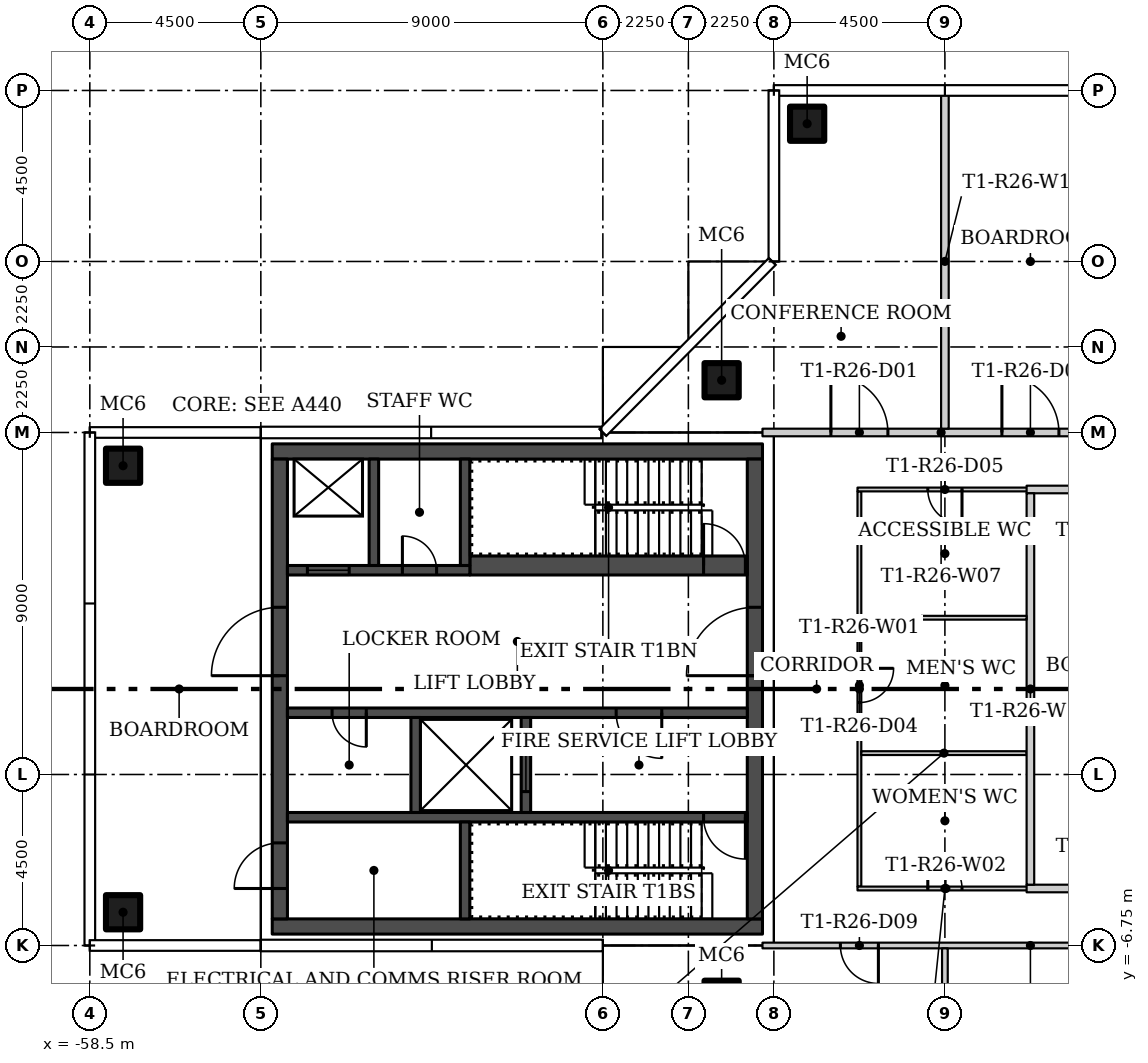
"""IFC4 building model, lengths in metres.
Left out: names, types, materials, properties, quantities, classifications, styles, units other than length and angle.
Written with IfcOpenShell. Run it as: python <this file> out.ifc"""

import sys

from ifc_helpers import new_model, si_unit, direction, frame, frame_2d, origin, origin_2d, place, context, subcontext, project, spatial, rectangle, hollow_rectangle, extrude, element, fill, save


model = new_model("IFC4")
c1 = context("Model", 3, precision=1e-05, world=origin(), true_north=direction((0.0, 1.0)))
c2 = subcontext(c1, "Body", "Model", "MODEL_VIEW")
j1 = project(units=[si_unit("LENGTHUNIT", "METRE"), si_unit("PLANEANGLEUNIT", "RADIAN")], contexts=[c1])
p1 = place(None, origin())
s1 = spatial("IfcSite", under=j1, at=p1, CompositionType="ELEMENT")
p2 = place(p1, origin())
s2 = spatial("IfcBuilding", under=s1, at=p2, CompositionType="ELEMENT")
p3 = place(p2, frame((0.0, 0.0, 242.1)))
s3 = spatial("IfcBuildingStorey", under=s2, at=p3, CompositionType="ELEMENT", Elevation=242.1)
for number, where in (
    (1, (-41.875, 8.125, 0.0)),
    (2, (-41.875, -8.125, 0.0)),
    (3, (-57.625, -5.875, 0.0)),
    (4, (-57.625, 5.875, 0.0)),
    (5, (-39.625, 14.875, 0.0)),
):
    element("IfcColumn", number, at=place(p3, frame(where)), inside=s3, PredefinedType="COLUMN", context=c2, shape_type="SweptSolid", body=[
        extrude(hollow_rectangle(XDim=0.9, YDim=0.9, WallThickness=0.036, at=origin_2d()), origin(), (0.0, 0.0, 1.0), 3.55),
    ])
p4 = place(p3, frame((-38.25, 5.2, 0.0), z_axis=(0.0, 0.0, 1.0), x_axis=(0.0, -1.0, 0.0)))
e6 = element("IfcWall", 6, at=p4, inside=s3, PredefinedType="PARTITIONING", context=c2, shape_type="SweptSolid", body=[
    extrude(rectangle(XDim=10.4, YDim=0.1, at=frame_2d((5.2, 0.0))), origin(), (0.0, 0.0, 1.0), 3.55),
])
p5 = place(p4, frame((4.656, 0.0, 0.0)))
e7 = element("IfcOpeningElement", 7, at=p5, cuts=e6, PredefinedType="OPENING", context=c2, shape_type="SweptSolid", body=[
    extrude(rectangle(XDim=0.9, YDim=2.1, at=frame_2d((0.45, 1.05))), frame((0.0, 0.06, 0.0), z_axis=(0.0, -1.0, 0.0), x_axis=(1.0, 0.0, 0.0)), (0.0, 0.0, 1.0), 0.12),
])
p6 = place(p3, frame((-38.3, -5.25, 0.0)))
e8 = element("IfcWall", 8, at=p6, inside=s3, PredefinedType="PARTITIONING", context=c2, shape_type="SweptSolid", body=[
    extrude(rectangle(XDim=4.65, YDim=0.1, at=frame_2d((2.325, 0.0))), origin(), (0.0, 0.0, 1.0), 3.55),
])
p7 = place(p6, frame((1.85, 0.0, 0.0)))
e9 = element("IfcOpeningElement", 9, at=p7, cuts=e8, PredefinedType="OPENING", context=c2, shape_type="SweptSolid", body=[
    extrude(rectangle(XDim=0.9, YDim=2.1, at=frame_2d((0.45, 1.05))), frame((0.0, 0.06, 0.0), z_axis=(0.0, -1.0, 0.0), x_axis=(1.0, 0.0, 0.0)), (0.0, 0.0, 1.0), 0.12),
])
p8 = place(p3, frame((-33.65, 5.25, 0.0), z_axis=(0.0, 0.0, 1.0), x_axis=(-1.0, 0.0, 0.0)))
e10 = element("IfcWall", 10, at=p8, inside=s3, PredefinedType="PARTITIONING", context=c2, shape_type="SweptSolid", body=[
    extrude(rectangle(XDim=4.65, YDim=0.1, at=frame_2d((2.325, 0.0))), origin(), (0.0, 0.0, 1.0), 3.55),
])
p9 = place(p8, frame((1.9, 0.0, 0.0)))
e11 = element("IfcOpeningElement", 11, at=p9, cuts=e10, PredefinedType="OPENING", context=c2, shape_type="SweptSolid", body=[
    extrude(rectangle(XDim=0.9, YDim=2.1, at=frame_2d((0.45, 1.05))), frame((0.0, 0.06, 0.0), z_axis=(0.0, -1.0, 0.0), x_axis=(1.0, 0.0, 0.0)), (0.0, 0.0, 1.0), 0.12),
])
p10 = place(p3, frame((-33.85, -5.25, 0.0)))
e12 = element("IfcWall", 12, at=p10, inside=s3, PredefinedType="PARTITIONING", context=c2, shape_type="SweptSolid", body=[
    extrude(rectangle(XDim=4.7, YDim=0.2, at=frame_2d((2.35, 0.0))), origin(), (0.0, 0.0, 1.0), 3.55),
])
p11 = place(p3, frame((-29.15, 5.25, 0.0), z_axis=(0.0, 0.0, 1.0), x_axis=(-1.0, 0.0, 0.0)))
e13 = element("IfcWall", 13, at=p11, inside=s3, PredefinedType="PARTITIONING", context=c2, shape_type="SweptSolid", body=[
    extrude(rectangle(XDim=4.7, YDim=0.2, at=frame_2d((2.35, 0.0))), origin(), (0.0, 0.0, 1.0), 3.55),
])
p12 = place(p3, frame((-40.8, 6.75, 0.0)))
e14 = element("IfcWall", 14, at=p12, inside=s3, PredefinedType="PARTITIONING", context=c2, shape_type="SweptSolid", body=[
    extrude(rectangle(XDim=9.4, YDim=0.2, at=frame_2d((4.7, 0.0))), origin(), (0.0, 0.0, 1.0), 3.55),
])
p13 = place(p12, frame((1.8, 0.0, 0.0)))
e15 = element("IfcOpeningElement", 15, at=p13, cuts=e14, PredefinedType="OPENING", context=c2, shape_type="SweptSolid", body=[
    extrude(rectangle(XDim=1.5, YDim=2.4, at=frame_2d((0.75, 1.2))), frame((0.0, 0.11, 0.0), z_axis=(0.0, -1.0, 0.0), x_axis=(1.0, 0.0, 0.0)), (0.0, 0.0, 1.0), 0.22),
])
p14 = place(p12, frame((6.3, 0.0, 0.0)))
e16 = element("IfcOpeningElement", 16, at=p14, cuts=e14, PredefinedType="OPENING", context=c2, shape_type="SweptSolid", body=[
    extrude(rectangle(XDim=1.5, YDim=2.4, at=frame_2d((0.75, 1.2))), frame((0.0, 0.11, 0.0), z_axis=(0.0, -1.0, 0.0), x_axis=(1.0, 0.0, 0.0)), (0.0, 0.0, 1.0), 0.22),
])
p15 = place(p3, frame((-26.7, -6.75, 0.0), z_axis=(0.0, 0.0, 1.0), x_axis=(-1.0, 0.0, 0.0)))
e17 = element("IfcWall", 17, at=p15, inside=s3, PredefinedType="PARTITIONING", context=c2, shape_type="SweptSolid", body=[
    extrude(rectangle(XDim=14.1, YDim=0.15, at=frame_2d((7.05, 0.0))), origin(), (0.0, 0.0, 1.0), 3.55),
])
p16 = place(p15, frame((4.05, 0.0, 0.0)))
e18 = element("IfcOpeningElement", 18, at=p16, cuts=e17, PredefinedType="OPENING", context=c2, shape_type="SweptSolid", body=[
    extrude(rectangle(XDim=1.5, YDim=2.1, at=frame_2d((0.75, 1.05))), frame((0.0, 0.085, 0.0), z_axis=(0.0, -1.0, 0.0), x_axis=(1.0, 0.0, 0.0)), (0.0, 0.0, 1.0), 0.17),
])
p17 = place(p15, frame((11.05, 0.0, 0.0)))
e19 = element("IfcOpeningElement", 19, at=p17, cuts=e17, PredefinedType="OPENING", context=c2, shape_type="SweptSolid", body=[
    extrude(rectangle(XDim=1.0, YDim=2.4, at=frame_2d((0.5, 1.2))), frame((0.0, 0.085, 0.0), z_axis=(0.0, -1.0, 0.0), x_axis=(1.0, 0.0, 0.0)), (0.0, 0.0, 1.0), 0.17),
])
p18 = place(p3, frame((-33.85, -1.688, 0.0), z_axis=(0.0, 0.0, 1.0), x_axis=(-1.0, 0.0, 0.0)))
e20 = element("IfcWall", 20, at=p18, inside=s3, PredefinedType="PARTITIONING", context=c2, shape_type="SweptSolid", body=[
    extrude(rectangle(XDim=4.35, YDim=0.1, at=frame_2d((2.175, 0.0))), origin(), (0.0, 0.0, 1.0), 3.55),
])
p19 = place(p3, frame((-33.75, -5.15, 0.0), z_axis=(0.0, 0.0, 1.0), x_axis=(0.0, 1.0, 0.0)))
e21 = element("IfcWall", 21, at=p19, inside=s3, PredefinedType="PARTITIONING", context=c2, shape_type="SweptSolid", body=[
    extrude(rectangle(XDim=10.3, YDim=0.2, at=frame_2d((5.15, 0.0))), origin(), (0.0, 0.0, 1.0), 3.55),
])
p20 = place(p3, frame((-33.85, 1.875, 0.0), z_axis=(0.0, 0.0, 1.0), x_axis=(-1.0, 0.0, 0.0)))
e22 = element("IfcWall", 22, at=p20, inside=s3, PredefinedType="PARTITIONING", context=c2, shape_type="SweptSolid", body=[
    extrude(rectangle(XDim=4.35, YDim=0.1, at=frame_2d((2.175, 0.0))), origin(), (0.0, 0.0, 1.0), 3.55),
])
p21 = place(p3, frame((-36.0, 6.85, 0.0), z_axis=(0.0, 0.0, 1.0), x_axis=(0.0, 1.0, 0.0)))
e23 = element("IfcWall", 23, at=p21, inside=s3, PredefinedType="PARTITIONING", context=c2, shape_type="SweptSolid", body=[
    extrude(rectangle(XDim=8.805, YDim=0.2, at=frame_2d((4.402, 0.0))), origin(), (0.0, 0.0, 1.0), 3.55),
])
p22 = place(p3, frame((-36.0, -20.155, 0.0), z_axis=(0.0, 0.0, 1.0), x_axis=(0.0, 1.0, 0.0)))
e24 = element("IfcWall", 24, at=p22, inside=s3, PredefinedType="PARTITIONING", context=c2, shape_type="SweptSolid", body=[
    extrude(rectangle(XDim=13.33, YDim=0.15, at=frame_2d((6.665, 0.0))), origin(), (0.0, 0.0, 1.0), 3.55),
])
for number, where, z_axis, x_axis in (
    (25, (-40.8, -6.25, 0.0), (0.0, 0.0, 1.0), (-1.0, 0.0, 0.0)),
    (26, (-40.8, 6.25, 0.0), (0.0, 0.0, 1.0), (-1.0, 0.0, 0.0)),
):
    element("IfcWall", number, at=place(p3, frame(where, z_axis=z_axis, x_axis=x_axis)), inside=s3, PredefinedType="SHEAR", context=c2, shape_type="SweptSolid", body=[
        extrude(rectangle(XDim=12.9, YDim=0.4, at=frame_2d((6.45, 0.0))), origin(), (0.0, 0.0, 1.0), 3.55),
    ])
p23 = place(p3, frame((-41.0, -6.05, 0.0), z_axis=(0.0, 0.0, 1.0), x_axis=(0.0, 1.0, 0.0)))
e27 = element("IfcWall", 27, at=p23, inside=s3, PredefinedType="SHEAR", context=c2, shape_type="SweptSolid", body=[
    extrude(rectangle(XDim=12.1, YDim=0.4, at=frame_2d((6.05, 0.0))), origin(), (0.0, 0.0, 1.0), 3.55),
])
p24 = place(p23, frame((6.4, 0.0, 0.0)))
e28 = element("IfcOpeningElement", 28, at=p24, cuts=e27, PredefinedType="OPENING", context=c2, shape_type="SweptSolid", body=[
    extrude(rectangle(XDim=1.8, YDim=2.4, at=frame_2d((0.9, 1.2))), frame((0.0, 0.21, 0.0), z_axis=(0.0, -1.0, 0.0), x_axis=(1.0, 0.0, 0.0)), (0.0, 0.0, 1.0), 0.42),
])
p25 = place(p3, frame((-53.5, -6.05, 0.0), z_axis=(0.0, 0.0, 1.0), x_axis=(0.0, 1.0, 0.0)))
e29 = element("IfcWall", 29, at=p25, inside=s3, PredefinedType="SHEAR", context=c2, shape_type="SweptSolid", body=[
    extrude(rectangle(XDim=12.1, YDim=0.4, at=frame_2d((6.05, 0.0))), origin(), (0.0, 0.0, 1.0), 3.55),
])
p26 = place(p25, frame((0.8, 0.0, 0.0)))
e30 = element("IfcOpeningElement", 30, at=p26, cuts=e29, PredefinedType="OPENING", context=c2, shape_type="SweptSolid", body=[
    extrude(rectangle(XDim=1.2, YDim=2.1, at=frame_2d((0.6, 1.05))), frame((0.0, 0.21, 0.0), z_axis=(0.0, -1.0, 0.0), x_axis=(1.0, 0.0, 0.0)), (0.0, 0.0, 1.0), 0.42),
])
p27 = place(p25, frame((6.4, 0.0, 0.0)))
e31 = element("IfcOpeningElement", 31, at=p27, cuts=e29, PredefinedType="OPENING", context=c2, shape_type="SweptSolid", body=[
    extrude(rectangle(XDim=1.8, YDim=2.4, at=frame_2d((0.9, 1.2))), frame((0.0, 0.21, 0.0), z_axis=(0.0, -1.0, 0.0), x_axis=(1.0, 0.0, 0.0)), (0.0, 0.0, 1.0), 0.42),
])
p28 = place(p3, frame((-41.2, -3.375, 0.0), z_axis=(0.0, 0.0, 1.0), x_axis=(-1.0, 0.0, 0.0)))
e32 = element("IfcWall", 32, at=p28, inside=s3, PredefinedType="SHEAR", context=c2, shape_type="SweptSolid", body=[
    extrude(rectangle(XDim=12.1, YDim=0.25, at=frame_2d((6.05, 0.0))), origin(), (0.0, 0.0, 1.0), 3.55),
])
p29 = place(p28, frame((0.05, 0.0, 0.0)))
e33 = element("IfcOpeningElement", 33, at=p29, cuts=e32, PredefinedType="OPENING", context=c2, shape_type="SweptSolid", body=[
    extrude(rectangle(XDim=1.1, YDim=2.1, at=frame_2d((0.55, 1.05))), frame((0.0, 0.135, 0.0), z_axis=(0.0, -1.0, 0.0), x_axis=(1.0, 0.0, 0.0)), (0.0, 0.0, 1.0), 0.27),
])
p30 = place(p3, frame((-48.625, -6.05, 0.0), z_axis=(0.0, 0.0, 1.0), x_axis=(0.0, 1.0, 0.0)))
e34 = element("IfcWall", 34, at=p30, inside=s3, PredefinedType="SHEAR", context=c2, shape_type="SweptSolid", body=[
    extrude(rectangle(XDim=2.55, YDim=0.25, at=frame_2d((1.275, 0.0))), origin(), (0.0, 0.0, 1.0), 3.55),
])
p31 = place(p3, frame((-41.2, -0.625, 0.0), z_axis=(0.0, 0.0, 1.0), x_axis=(-1.0, 0.0, 0.0)))
e35 = element("IfcWall", 35, at=p31, inside=s3, PredefinedType="SHEAR", context=c2, shape_type="SweptSolid", body=[
    extrude(rectangle(XDim=12.1, YDim=0.25, at=frame_2d((6.05, 0.0))), origin(), (0.0, 0.0, 1.0), 3.55),
])
p32 = place(p31, frame((2.25, 0.0, 0.0)))
e36 = element("IfcOpeningElement", 36, at=p32, cuts=e35, PredefinedType="OPENING", context=c2, shape_type="SweptSolid", body=[
    extrude(rectangle(XDim=1.2, YDim=2.1, at=frame_2d((0.6, 1.05))), frame((0.0, 0.135, 0.0), z_axis=(0.0, -1.0, 0.0), x_axis=(1.0, 0.0, 0.0)), (0.0, 0.0, 1.0), 0.27),
])
p33 = place(p31, frame((10.025, 0.0, 0.0)))
e37 = element("IfcOpeningElement", 37, at=p33, cuts=e35, PredefinedType="OPENING", context=c2, shape_type="SweptSolid", body=[
    extrude(rectangle(XDim=0.9, YDim=2.1, at=frame_2d((0.45, 1.05))), frame((0.0, 0.135, 0.0), z_axis=(0.0, -1.0, 0.0), x_axis=(1.0, 0.0, 0.0)), (0.0, 0.0, 1.0), 0.27),
])
p34 = place(p3, frame((-47.025, -3.25, 0.0), z_axis=(0.0, 0.0, 1.0), x_axis=(0.0, 1.0, 0.0)))
e38 = element("IfcWall", 38, at=p34, inside=s3, PredefinedType="SHEAR", context=c2, shape_type="SweptSolid", body=[
    extrude(rectangle(XDim=2.5, YDim=0.25, at=frame_2d((1.25, 0.0))), origin(), (0.0, 0.0, 1.0), 3.55),
])
p35 = place(p34, frame((0.55, 0.0, 0.0)))
e39 = element("IfcOpeningElement", 39, at=p35, cuts=e38, PredefinedType="OPENING", context=c2, shape_type="SweptSolid", body=[
    extrude(rectangle(XDim=1.4, YDim=2.4, at=frame_2d((0.7, 1.2))), frame((0.0, 0.135, 0.0), z_axis=(0.0, -1.0, 0.0), x_axis=(1.0, 0.0, 0.0)), (0.0, 0.0, 1.0), 0.27),
])
p36 = place(p3, frame((-49.925, -3.25, 0.0), z_axis=(0.0, 0.0, 1.0), x_axis=(0.0, 1.0, 0.0)))
e40 = element("IfcWall", 40, at=p36, inside=s3, PredefinedType="SHEAR", context=c2, shape_type="SweptSolid", body=[
    extrude(rectangle(XDim=2.5, YDim=0.25, at=frame_2d((1.25, 0.0))), origin(), (0.0, 0.0, 1.0), 3.55),
])
p37 = place(p3, frame((-48.5, 3.25, 0.0)))
e41 = element("IfcWall", 41, at=p37, inside=s3, PredefinedType="SHEAR", context=c2, shape_type="SweptSolid", body=[
    extrude(rectangle(XDim=7.3, YDim=0.5, at=frame_2d((3.65, 0.0))), origin(), (0.0, 0.0, 1.0), 3.55),
])
p38 = place(p37, frame((6.15, 0.0, 0.0)))
e42 = element("IfcOpeningElement", 42, at=p38, cuts=e41, PredefinedType="OPENING", context=c2, shape_type="SweptSolid", body=[
    extrude(rectangle(XDim=1.1, YDim=2.1, at=frame_2d((0.55, 1.05))), frame((0.0, 0.26, 0.0), z_axis=(0.0, -1.0, 0.0), x_axis=(1.0, 0.0, 0.0)), (0.0, 0.0, 1.0), 0.52),
])
p39 = place(p3, frame((-53.3, 3.125, 0.0)))
e43 = element("IfcWall", 43, at=p39, inside=s3, PredefinedType="SHEAR", context=c2, shape_type="SweptSolid", body=[
    extrude(rectangle(XDim=4.8, YDim=0.25, at=frame_2d((2.4, 0.0))), origin(), (0.0, 0.0, 1.0), 3.55),
])
p40 = place(p39, frame((0.525, 0.0, 0.0)))
e44 = element("IfcOpeningElement", 44, at=p40, cuts=e43, PredefinedType="OPENING", context=c2, shape_type="SweptSolid", body=[
    extrude(rectangle(XDim=1.1, YDim=2.1, at=frame_2d((0.55, 1.05))), frame((0.0, 0.135, 0.0), z_axis=(0.0, -1.0, 0.0), x_axis=(1.0, 0.0, 0.0)), (0.0, 0.0, 1.0), 0.27),
])
p41 = place(p39, frame((3.025, 0.0, 0.0)))
e45 = element("IfcOpeningElement", 45, at=p41, cuts=e43, PredefinedType="OPENING", context=c2, shape_type="SweptSolid", body=[
    extrude(rectangle(XDim=0.9, YDim=2.1, at=frame_2d((0.45, 1.05))), frame((0.0, 0.135, 0.0), z_axis=(0.0, -1.0, 0.0), x_axis=(1.0, 0.0, 0.0)), (0.0, 0.0, 1.0), 0.27),
])
for number, where, z_axis, x_axis in (
    (46, (-48.625, 3.25, 0.0), (0.0, 0.0, 1.0), (0.0, 1.0, 0.0)),
    (47, (-51.025, 3.25, 0.0), (0.0, 0.0, 1.0), (0.0, 1.0, 0.0)),
):
    element("IfcWall", number, at=place(p3, frame(where, z_axis=z_axis, x_axis=x_axis)), inside=s3, PredefinedType="SHEAR", context=c2, shape_type="SweptSolid", body=[
        extrude(rectangle(XDim=2.8, YDim=0.25, at=frame_2d((1.4, 0.0))), origin(), (0.0, 0.0, 1.0), 3.55),
    ])
p42 = place(p13, origin())
e48 = element("IfcDoor", 48, at=p42, inside=s3, OperationType="DOUBLE_DOOR_SINGLE_SWING", PredefinedType="DOOR", context=c2, shape_type="SweptSolid", body=[
    extrude(rectangle(XDim=1.5, YDim=2.4, at=frame_2d((0.75, 1.2))), frame((0.0, 0.025, 0.0), z_axis=(0.0, -1.0, 0.0), x_axis=(1.0, 0.0, 0.0)), (0.0, 0.0, 1.0), 0.05),
])
fill(e15, e48)
p43 = place(p14, origin())
e49 = element("IfcDoor", 49, at=p43, inside=s3, OperationType="DOUBLE_DOOR_SINGLE_SWING", PredefinedType="DOOR", context=c2, shape_type="SweptSolid", body=[
    extrude(rectangle(XDim=1.5, YDim=2.4, at=frame_2d((0.75, 1.2))), frame((0.0, 0.025, 0.0), z_axis=(0.0, -1.0, 0.0), x_axis=(1.0, 0.0, 0.0)), (0.0, 0.0, 1.0), 0.05),
])
fill(e16, e49)
p44 = place(p7, origin())
e50 = element("IfcDoor", 50, at=p44, inside=s3, OperationType="SINGLE_SWING_LEFT", PredefinedType="DOOR", context=c2, shape_type="SweptSolid", body=[
    extrude(rectangle(XDim=0.9, YDim=2.1, at=frame_2d((0.45, 1.05))), frame((0.0, 0.025, 0.0), z_axis=(0.0, -1.0, 0.0), x_axis=(1.0, 0.0, 0.0)), (0.0, 0.0, 1.0), 0.05),
])
fill(e9, e50)
p45 = place(p5, origin())
e51 = element("IfcDoor", 51, at=p45, inside=s3, OperationType="SINGLE_SWING_LEFT", PredefinedType="DOOR", context=c2, shape_type="SweptSolid", body=[
    extrude(rectangle(XDim=0.9, YDim=2.1, at=frame_2d((0.45, 1.05))), frame((0.0, 0.025, 0.0), z_axis=(0.0, -1.0, 0.0), x_axis=(1.0, 0.0, 0.0)), (0.0, 0.0, 1.0), 0.05),
])
fill(e7, e51)
p46 = place(p9, origin())
e52 = element("IfcDoor", 52, at=p46, inside=s3, OperationType="SINGLE_SWING_RIGHT", PredefinedType="DOOR", context=c2, shape_type="SweptSolid", body=[
    extrude(rectangle(XDim=0.9, YDim=2.1, at=frame_2d((0.45, 1.05))), frame((0.0, 0.025, 0.0), z_axis=(0.0, -1.0, 0.0), x_axis=(1.0, 0.0, 0.0)), (0.0, 0.0, 1.0), 0.05),
])
fill(e11, e52)
p47 = place(p17, origin())
e53 = element("IfcDoor", 53, at=p47, inside=s3, OperationType="SINGLE_SWING_RIGHT", PredefinedType="DOOR", context=c2, shape_type="SweptSolid", body=[
    extrude(rectangle(XDim=1.0, YDim=2.4, at=frame_2d((0.5, 1.2))), frame((0.0, 0.025, 0.0), z_axis=(0.0, -1.0, 0.0), x_axis=(1.0, 0.0, 0.0)), (0.0, 0.0, 1.0), 0.05),
])
fill(e19, e53)
p48 = place(p24, origin())
e54 = element("IfcDoor", 54, at=p48, inside=s3, OperationType="DOUBLE_DOOR_SINGLE_SWING", PredefinedType="DOOR", context=c2, shape_type="SweptSolid", body=[
    extrude(rectangle(XDim=1.8, YDim=2.4, at=frame_2d((0.9, 1.2))), frame((0.0, 0.025, 0.0), z_axis=(0.0, -1.0, 0.0), x_axis=(1.0, 0.0, 0.0)), (0.0, 0.0, 1.0), 0.05),
])
fill(e28, e54)
p49 = place(p26, origin())
e55 = element("IfcDoor", 55, at=p49, inside=s3, OperationType="SINGLE_SWING_LEFT", PredefinedType="DOOR", context=c2, shape_type="SweptSolid", body=[
    extrude(rectangle(XDim=1.2, YDim=2.1, at=frame_2d((0.6, 1.05))), frame((0.0, 0.025, 0.0), z_axis=(0.0, -1.0, 0.0), x_axis=(1.0, 0.0, 0.0)), (0.0, 0.0, 1.0), 0.05),
])
fill(e30, e55)
p50 = place(p27, origin())
e56 = element("IfcDoor", 56, at=p50, inside=s3, OperationType="DOUBLE_DOOR_SINGLE_SWING", PredefinedType="DOOR", context=c2, shape_type="SweptSolid", body=[
    extrude(rectangle(XDim=1.8, YDim=2.4, at=frame_2d((0.9, 1.2))), frame((0.0, 0.025, 0.0), z_axis=(0.0, -1.0, 0.0), x_axis=(1.0, 0.0, 0.0)), (0.0, 0.0, 1.0), 0.05),
])
fill(e31, e56)
p51 = place(p29, origin())
e57 = element("IfcDoor", 57, at=p51, inside=s3, OperationType="SINGLE_SWING_LEFT", PredefinedType="DOOR", context=c2, shape_type="SweptSolid", body=[
    extrude(rectangle(XDim=1.1, YDim=2.1, at=frame_2d((0.55, 1.05))), frame((0.0, 0.025, 0.0), z_axis=(0.0, -1.0, 0.0), x_axis=(1.0, 0.0, 0.0)), (0.0, 0.0, 1.0), 0.05),
])
fill(e33, e57)
p52 = place(p32, origin())
e58 = element("IfcDoor", 58, at=p52, inside=s3, OperationType="SINGLE_SWING_LEFT", PredefinedType="DOOR", context=c2, shape_type="SweptSolid", body=[
    extrude(rectangle(XDim=1.2, YDim=2.1, at=frame_2d((0.6, 1.05))), frame((0.0, 0.025, 0.0), z_axis=(0.0, -1.0, 0.0), x_axis=(1.0, 0.0, 0.0)), (0.0, 0.0, 1.0), 0.05),
])
fill(e36, e58)
p53 = place(p33, origin())
e59 = element("IfcDoor", 59, at=p53, inside=s3, OperationType="SINGLE_SWING_RIGHT", PredefinedType="DOOR", context=c2, shape_type="SweptSolid", body=[
    extrude(rectangle(XDim=0.9, YDim=2.1, at=frame_2d((0.45, 1.05))), frame((0.0, 0.025, 0.0), z_axis=(0.0, -1.0, 0.0), x_axis=(1.0, 0.0, 0.0)), (0.0, 0.0, 1.0), 0.05),
])
fill(e37, e59)
p54 = place(p35, origin())
e60 = element("IfcDoor", 60, at=p54, inside=s3, OperationType="SLIDING_TO_LEFT", PredefinedType="DOOR", context=c2, shape_type="SweptSolid", body=[
    extrude(rectangle(XDim=1.4, YDim=2.4, at=frame_2d((0.7, 1.2))), frame((0.0, 0.025, 0.0), z_axis=(0.0, -1.0, 0.0), x_axis=(1.0, 0.0, 0.0)), (0.0, 0.0, 1.0), 0.05),
])
fill(e39, e60)
p55 = place(p38, origin())
e61 = element("IfcDoor", 61, at=p55, inside=s3, OperationType="SINGLE_SWING_RIGHT", PredefinedType="DOOR", context=c2, shape_type="SweptSolid", body=[
    extrude(rectangle(XDim=1.1, YDim=2.1, at=frame_2d((0.55, 1.05))), frame((0.0, 0.025, 0.0), z_axis=(0.0, -1.0, 0.0), x_axis=(1.0, 0.0, 0.0)), (0.0, 0.0, 1.0), 0.05),
])
fill(e42, e61)
p56 = place(p40, origin())
e62 = element("IfcDoor", 62, at=p56, inside=s3, OperationType="SLIDING_TO_LEFT", PredefinedType="DOOR", context=c2, shape_type="SweptSolid", body=[
    extrude(rectangle(XDim=1.1, YDim=2.1, at=frame_2d((0.55, 1.05))), frame((0.0, 0.025, 0.0), z_axis=(0.0, -1.0, 0.0), x_axis=(1.0, 0.0, 0.0)), (0.0, 0.0, 1.0), 0.05),
])
fill(e44, e62)
p57 = place(p41, origin())
e63 = element("IfcDoor", 63, at=p57, inside=s3, OperationType="SINGLE_SWING_RIGHT", PredefinedType="DOOR", context=c2, shape_type="SweptSolid", body=[
    extrude(rectangle(XDim=0.9, YDim=2.1, at=frame_2d((0.45, 1.05))), frame((0.0, 0.025, 0.0), z_axis=(0.0, -1.0, 0.0), x_axis=(1.0, 0.0, 0.0)), (0.0, 0.0, 1.0), 0.05),
])
fill(e45, e63)
save(model, sys.argv[1])
